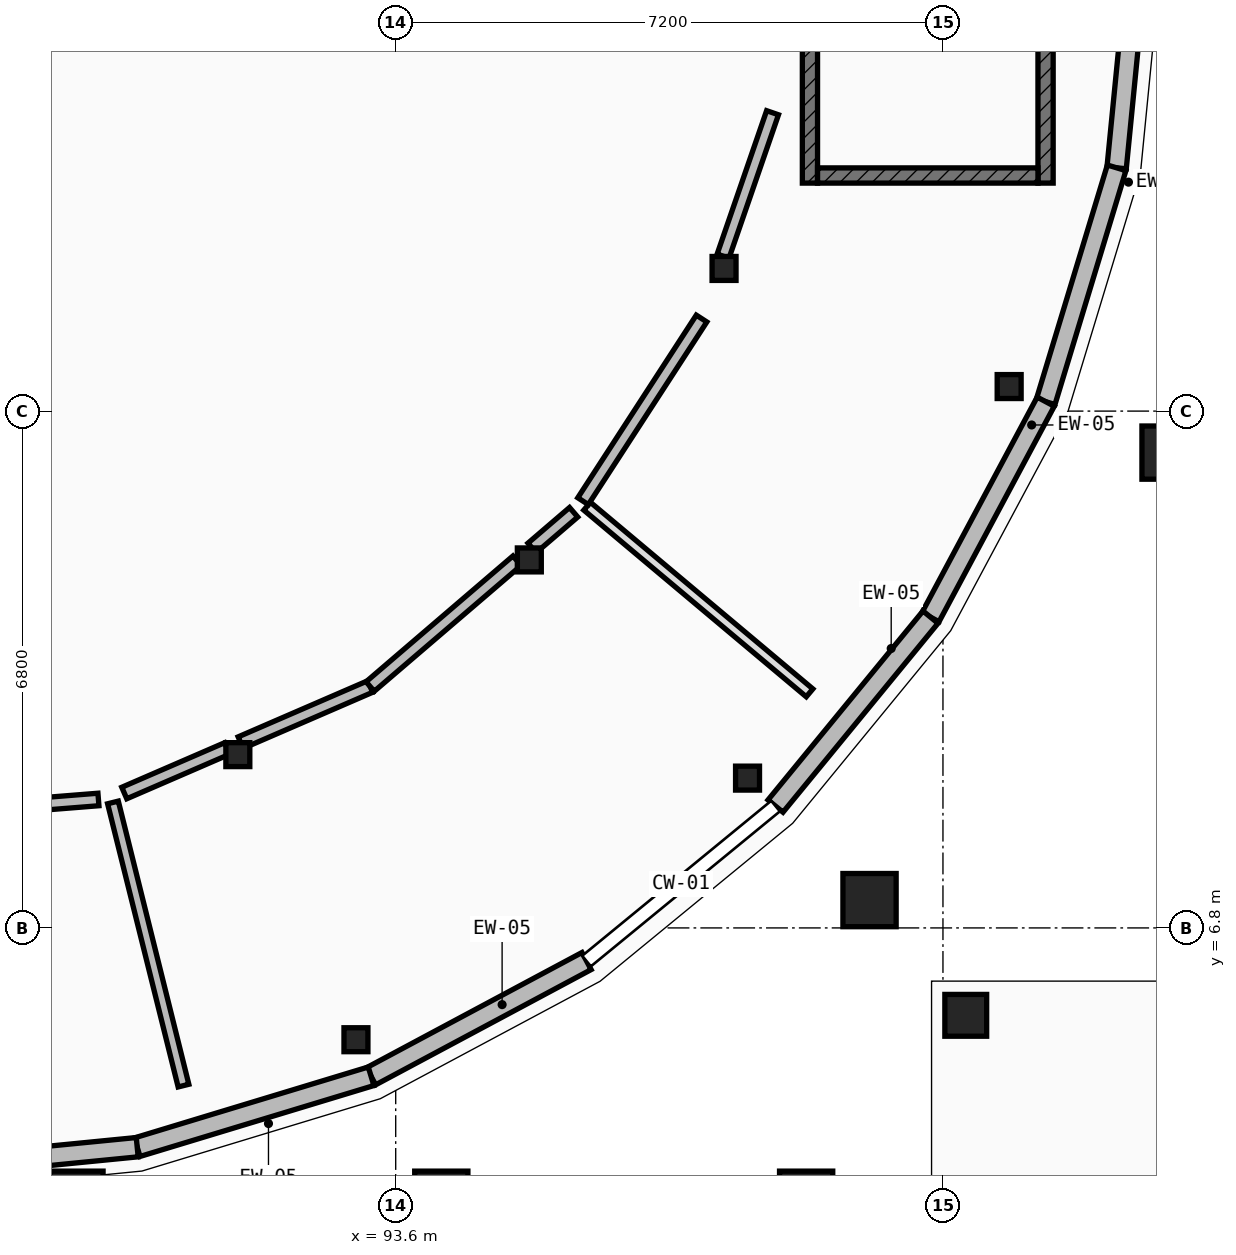
"""IFC4 building model, lengths in metres.
Left out: names, types, materials, properties, quantities, classifications, styles, units other than length and angle.
Written with IfcOpenShell. Run it as: python <this file> out.ifc"""

import sys

from ifc_helpers import new_model, si_unit, direction, frame, frame_2d, origin, origin_2d, place, context, subcontext, project, spatial, rectangle, circle, extrude, element, fill, save


model = new_model("IFC4")
c1 = context("Model", 3, precision=1e-05, world=origin(), true_north=direction((0.0, 1.0)))
c2 = subcontext(c1, "Body", "Model", "MODEL_VIEW")
j1 = project(units=[si_unit("LENGTHUNIT", "METRE"), si_unit("PLANEANGLEUNIT", "RADIAN")], contexts=[c1])
p1 = place(None, origin())
s1 = spatial("IfcSite", under=j1, at=p1, CompositionType="ELEMENT")
p2 = place(p1, origin())
s2 = spatial("IfcBuilding", under=s1, at=p2, CompositionType="ELEMENT")
p3 = place(p2, frame((0.0, 0.0, 4.55)))
s3 = spatial("IfcBuildingStorey", under=s2, at=p3, CompositionType="ELEMENT", Elevation=4.55)
for number, where, z_axis, x_axis in (
    (1, (93.077, 5.329, 0.0), (0.0, 0.0, 1.0), (1.0, 0.0, 0.0)),
    (2, (98.229, 8.771, 0.0), (0.0, 0.0, 1.0), (1.0, 0.0, 0.0)),
    (3, (101.671, 13.923, 0.0), (0.0, 0.0, 1.0), (1.0, 0.0, 0.0)),
    (4, (91.523, 9.08, 0.0), (0.0, 0.0, 1.0), (1.0, 0.0, 0.0)),
    (5, (95.358, 11.642, 0.0), (0.0, 0.0, 1.0), (1.0, 0.0, 0.0)),
    (6, (97.92, 15.477, 0.0), (0.0, 0.0, 1.0), (1.0, 0.0, 0.0)),
):
    element("IfcColumn", number, at=place(p3, frame(where, z_axis=z_axis, x_axis=x_axis)), inside=s3, PredefinedType="COLUMN", context=c2, shape_type="SweptSolid", body=[
        extrude(rectangle(XDim=0.315, YDim=0.315, at=origin_2d()), origin(), (0.0, 0.0, 1.0), 4.2),
    ])
for number, where, z_axis, x_axis in (
    (7, (89.4, 3.25, 0.0), (0.0, 0.0, 1.0), (1.0, 0.0, 0.0)),
    (8, (94.2, 3.25, 0.0), (0.0, 0.0, 1.0), (1.0, 0.0, 0.0)),
    (9, (99.0, 3.25, 0.0), (0.0, 0.0, 1.0), (1.0, 0.0, 0.0)),
):
    element("IfcColumn", number, at=place(p3, frame(where, z_axis=z_axis, x_axis=x_axis)), inside=s3, PredefinedType="COLUMN", context=c2, shape_type="SweptSolid", body=[
        extrude(circle(Radius=0.35, at=origin_2d()), origin(), (0.0, 0.0, 1.0), 4.2),
    ])
p4 = place(p3, frame((101.1, 5.65, 0.0), z_axis=(0.0, 0.0, 1.0), x_axis=(1.0, 0.0, 0.0)))
e10 = element("IfcColumn", 10, at=p4, inside=s3, PredefinedType="PILASTER", context=c2, shape_type="SweptSolid", body=[
    extrude(circle(Radius=0.275, at=origin_2d()), origin(), (0.0, 0.0, 1.0), 2.4),
])
for number, where, z_axis, x_axis in (
    (11, (99.834, 7.166, 0.0), (0.0, 0.0, 1.0), (1.0, 0.0, 0.0)),
    (12, (103.768, 13.054, 0.0), (0.0, 0.0, 1.0), (1.0, 0.0, 0.0)),
):
    element("IfcColumn", number, at=place(p3, frame(where, z_axis=z_axis, x_axis=x_axis)), inside=s3, PredefinedType="COLUMN", context=c2, shape_type="SweptSolid", body=[
        extrude(circle(Radius=0.35, at=origin_2d()), origin(), (0.0, 0.0, 1.0), 4.2),
    ])
p5 = place(p3, frame((103.4, 20.0, 0.0), z_axis=(0.0, 0.0, 1.0), x_axis=(-0.097977057849, -0.995188673637, 0.0)))
e13 = element("IfcWall", 13, at=p5, inside=s3, PredefinedType="ELEMENTEDWALL", context=c2, shape_type="SweptSolid", body=[
    extrude(rectangle(XDim=3.214, YDim=0.255, at=frame_2d((1.607, 0.0))), origin(), (0.0, 0.0, 1.0), 3.314),
])
p6 = place(p3, frame((103.085, 16.801, 0.0), z_axis=(0.0, 0.0, 1.0), x_axis=(-0.29014016356, -0.956984161567, 0.0)))
e14 = element("IfcWall", 14, at=p6, inside=s3, PredefinedType="ELEMENTEDWALL", context=c2, shape_type="SweptSolid", body=[
    extrude(rectangle(XDim=3.215, YDim=0.255, at=frame_2d((1.607, 0.0))), origin(), (0.0, 0.0, 1.0), 3.314),
])
p7 = place(p6, frame((1.198, 0.0, 0.85)))
e15 = element("IfcOpeningElement", 15, at=p7, cuts=e14, PredefinedType="OPENING", context=c2, shape_type="SweptSolid", body=[
    extrude(rectangle(XDim=0.82, YDim=1.45, at=frame_2d((0.41, 0.725))), frame((0.0, 0.137, 0.0), z_axis=(0.0, -1.0, 0.0), x_axis=(1.0, 0.0, 0.0)), (0.0, 0.0, 1.0), 0.275),
])
p8 = place(p3, frame((102.152, 13.724, 0.0), z_axis=(0.0, 0.0, 1.0), x_axis=(-0.47155750426, -0.881835313523, 0.0)))
e16 = element("IfcWall", 16, at=p8, inside=s3, PredefinedType="ELEMENTEDWALL", context=c2, shape_type="SweptSolid", body=[
    extrude(rectangle(XDim=3.215, YDim=0.255, at=frame_2d((1.607, 0.0))), origin(), (0.0, 0.0, 1.0), 3.314),
])
p9 = place(p8, frame((1.182, 0.0, 0.85)))
e17 = element("IfcOpeningElement", 17, at=p9, cuts=e16, PredefinedType="OPENING", context=c2, shape_type="SweptSolid", body=[
    extrude(rectangle(XDim=0.85, YDim=1.5, at=frame_2d((0.425, 0.75))), frame((0.0, 0.137, 0.0), z_axis=(0.0, -1.0, 0.0), x_axis=(1.0, 0.0, 0.0)), (0.0, 0.0, 1.0), 0.275),
])
p10 = place(p3, frame((100.636, 10.889, 0.0), z_axis=(0.0, 0.0, 1.0), x_axis=(-0.634204896314, -0.773165020866, 0.0)))
e18 = element("IfcWall", 18, at=p10, inside=s3, PredefinedType="ELEMENTEDWALL", context=c2, shape_type="SweptSolid", body=[
    extrude(rectangle(XDim=3.215, YDim=0.255, at=frame_2d((1.607, 0.0))), origin(), (0.0, 0.0, 1.0), 3.314),
])
p11 = place(p10, frame((1.183, 0.0, 0.85)))
e19 = element("IfcOpeningElement", 19, at=p11, cuts=e18, PredefinedType="OPENING", context=c2, shape_type="SweptSolid", body=[
    extrude(rectangle(XDim=0.85, YDim=1.75, at=frame_2d((0.425, 0.875))), frame((0.0, 0.137, 0.0), z_axis=(0.0, -1.0, 0.0), x_axis=(1.0, 0.0, 0.0)), (0.0, 0.0, 1.0), 0.275),
])
p12 = place(p3, frame((96.111, 6.364, 0.0), z_axis=(0.0, 0.0, 1.0), x_axis=(-0.881835313523, -0.47155750426, 0.0)))
e20 = element("IfcWall", 20, at=p12, inside=s3, PredefinedType="ELEMENTEDWALL", context=c2, shape_type="SweptSolid", body=[
    extrude(rectangle(XDim=3.215, YDim=0.255, at=frame_2d((1.607, 0.0))), origin(), (0.0, 0.0, 1.0), 3.314),
])
p13 = place(p12, frame((1.167, 0.0, 0.85)))
e21 = element("IfcOpeningElement", 21, at=p13, cuts=e20, PredefinedType="OPENING", context=c2, shape_type="SweptSolid", body=[
    extrude(rectangle(XDim=0.88, YDim=1.6, at=frame_2d((0.44, 0.8))), frame((0.0, 0.137, 0.0), z_axis=(0.0, -1.0, 0.0), x_axis=(1.0, 0.0, 0.0)), (0.0, 0.0, 1.0), 0.275),
])
p14 = place(p3, frame((93.276, 4.848, 0.0), z_axis=(0.0, 0.0, 1.0), x_axis=(-0.956984161567, -0.29014016356, 0.0)))
e22 = element("IfcWall", 22, at=p14, inside=s3, PredefinedType="ELEMENTEDWALL", context=c2, shape_type="SweptSolid", body=[
    extrude(rectangle(XDim=3.215, YDim=0.255, at=frame_2d((1.607, 0.0))), origin(), (0.0, 0.0, 1.0), 3.314),
])
p15 = place(p14, frame((1.158, 0.0, 0.85)))
e23 = element("IfcOpeningElement", 23, at=p15, cuts=e22, PredefinedType="OPENING", context=c2, shape_type="SweptSolid", body=[
    extrude(rectangle(XDim=0.9, YDim=1.4, at=frame_2d((0.45, 0.7))), frame((0.0, 0.137, 0.0), z_axis=(0.0, -1.0, 0.0), x_axis=(1.0, 0.0, 0.0)), (0.0, 0.0, 1.0), 0.275),
])
p16 = place(p3, frame((90.199, 3.915, 0.0), z_axis=(0.0, 0.0, 1.0), x_axis=(-0.995188673637, -0.097977057849, 0.0)))
e24 = element("IfcWall", 24, at=p16, inside=s3, PredefinedType="ELEMENTEDWALL", context=c2, shape_type="SweptSolid", body=[
    extrude(rectangle(XDim=3.214, YDim=0.255, at=frame_2d((1.607, 0.0))), origin(), (0.0, 0.0, 1.0), 3.314),
])
p17 = place(p3, frame((99.05, 23.4, 0.0), z_axis=(0.0, 0.0, 1.0), x_axis=(0.0, -1.0, 0.0)))
e25 = element("IfcWall", 25, at=p17, inside=s3, PredefinedType="SHEAR", context=c2, shape_type="SweptSolid", body=[
    extrude(rectangle(XDim=6.8, YDim=0.2, at=frame_2d((3.4, 0.0))), origin(), (0.0, 0.0, 1.0), 3.3),
])
p18 = place(p17, frame((0.38, 0.0, 0.0)))
e26 = element("IfcOpeningElement", 26, at=p18, cuts=e25, PredefinedType="OPENING", context=c2, shape_type="SweptSolid", body=[
    extrude(rectangle(XDim=1.1, YDim=2.15, at=frame_2d((0.55, 1.075))), frame((0.0, 0.11, 0.0), z_axis=(0.0, -1.0, 0.0), x_axis=(1.0, 0.0, 0.0)), (0.0, 0.0, 1.0), 0.22),
])
p19 = place(p3, frame((102.15, 23.4, 0.0), z_axis=(0.0, 0.0, 1.0), x_axis=(0.0, -1.0, 0.0)))
e27 = element("IfcWall", 27, at=p19, inside=s3, PredefinedType="SHEAR", context=c2, shape_type="SweptSolid", body=[
    extrude(rectangle(XDim=6.8, YDim=0.2, at=frame_2d((3.4, 0.0))), origin(), (0.0, 0.0, 1.0), 3.3),
])
p20 = place(p3, frame((99.15, 16.7, 0.0), z_axis=(0.0, 0.0, 1.0), x_axis=(1.0, 0.0, 0.0)))
e28 = element("IfcWall", 28, at=p20, inside=s3, PredefinedType="SHEAR", context=c2, shape_type="SweptSolid", body=[
    extrude(rectangle(XDim=2.9, YDim=0.2, at=frame_2d((1.45, 0.0))), origin(), (0.0, 0.0, 1.0), 3.3),
])
p21 = place(p3, frame((89.88, 8.451, 0.0), z_axis=(0.0, 0.0, 1.0), x_axis=(0.241742626418, -0.970340405514, 0.0)))
e29 = element("IfcWall", 29, at=p21, inside=s3, PredefinedType="PARTITIONING", context=c2, shape_type="SweptSolid", body=[
    extrude(rectangle(XDim=3.84, YDim=0.145, at=frame_2d((1.92, 0.0))), origin(), (0.0, 0.0, 1.0), 3.3),
])
p22 = place(p3, frame((96.118, 12.349, 0.0), z_axis=(0.0, 0.0, 1.0), x_axis=(0.766043356979, -0.642788904096, 0.0)))
e30 = element("IfcWall", 30, at=p22, inside=s3, PredefinedType="PLUMBINGWALL", context=c2, shape_type="SweptSolid", body=[
    extrude(rectangle(XDim=3.821, YDim=0.135, at=frame_2d((1.911, 0.0))), origin(), (0.0, 0.0, 1.0), 3.3),
])
p23 = place(p3, frame((87.124, 8.285, 0.0), z_axis=(0.0, 0.0, 1.0), x_axis=(0.996818897766, 0.079699968982, 0.0)))
e31 = element("IfcWall", 31, at=p23, inside=s3, PredefinedType="PARTITIONING", context=c2, shape_type="SweptSolid", body=[
    extrude(rectangle(XDim=2.573, YDim=0.165, at=frame_2d((1.287, 0.0))), origin(), (0.0, 0.0, 1.0), 3.3),
])
p24 = place(p3, frame((90.029, 8.575, 0.0), z_axis=(0.0, 0.0, 1.0), x_axis=(0.917648226471, 0.397393674401, 0.0)))
e32 = element("IfcWall", 32, at=p24, inside=s3, PredefinedType="PARTITIONING", context=c2, shape_type="SweptSolid", body=[
    extrude(rectangle(XDim=1.474, YDim=0.165, at=frame_2d((0.737, 0.0))), origin(), (0.0, 0.0, 1.0), 3.3),
])
p25 = place(p24, frame((0.282, 0.0, 0.0)))
e33 = element("IfcOpeningElement", 33, at=p25, cuts=e32, PredefinedType="OPENING", context=c2, shape_type="SweptSolid", body=[
    extrude(rectangle(XDim=0.91, YDim=2.15, at=frame_2d((0.455, 1.075))), frame((0.0, 0.093, 0.0), z_axis=(0.0, -1.0, 0.0), x_axis=(1.0, 0.0, 0.0)), (0.0, 0.0, 1.0), 0.185),
])
p26 = place(p3, frame((91.56, 9.238, 0.0), z_axis=(0.0, 0.0, 1.0), x_axis=(0.917614776026, 0.397470908142, 0.0)))
e34 = element("IfcWall", 34, at=p26, inside=s3, PredefinedType="PARTITIONING", context=c2, shape_type="SweptSolid", body=[
    extrude(rectangle(XDim=1.857, YDim=0.165, at=frame_2d((0.928, 0.0))), origin(), (0.0, 0.0, 1.0), 3.3),
])
p27 = place(p3, frame((93.264, 9.976, 0.0), z_axis=(0.0, 0.0, 1.0), x_axis=(0.759466556713, 0.650546346722, 0.0)))
e35 = element("IfcWall", 35, at=p27, inside=s3, PredefinedType="PARTITIONING", context=c2, shape_type="SweptSolid", body=[
    extrude(rectangle(XDim=2.544, YDim=0.165, at=frame_2d((1.272, 0.0))), origin(), (0.0, 0.0, 1.0), 3.3),
])
p28 = place(p3, frame((95.394, 11.8, 0.0), z_axis=(0.0, 0.0, 1.0), x_axis=(0.759089131102, 0.650986705735, 0.0)))
e36 = element("IfcWall", 36, at=p28, inside=s3, PredefinedType="PARTITIONING", context=c2, shape_type="SweptSolid", body=[
    extrude(rectangle(XDim=0.72, YDim=0.165, at=frame_2d((0.36, 0.0))), origin(), (0.0, 0.0, 1.0), 3.3),
])
p29 = place(p3, frame((96.065, 12.415, 0.0), z_axis=(0.0, 0.0, 1.0), x_axis=(0.544272168669, 0.838908699688, 0.0)))
e37 = element("IfcWall", 37, at=p29, inside=s3, PredefinedType="PARTITIONING", context=c2, shape_type="SweptSolid", body=[
    extrude(rectangle(XDim=2.865, YDim=0.165, at=frame_2d((1.432, 0.0))), origin(), (0.0, 0.0, 1.0), 3.3),
])
p30 = place(p29, frame((0.982, 0.0, 0.0)))
e38 = element("IfcOpeningElement", 38, at=p30, cuts=e37, PredefinedType="OPENING", context=c2, shape_type="SweptSolid", body=[
    extrude(rectangle(XDim=0.9, YDim=2.1, at=frame_2d((0.45, 1.05))), frame((0.0, 0.093, 0.0), z_axis=(0.0, -1.0, 0.0), x_axis=(1.0, 0.0, 0.0)), (0.0, 0.0, 1.0), 0.185),
])
p31 = place(p3, frame((97.907, 15.639, 0.0), z_axis=(0.0, 0.0, 1.0), x_axis=(0.326190447052, 0.945304073964, 0.0)))
e39 = element("IfcWall", 39, at=p31, inside=s3, PredefinedType="PARTITIONING", context=c2, shape_type="SweptSolid", body=[
    extrude(rectangle(XDim=1.996, YDim=0.165, at=frame_2d((0.998, 0.0))), origin(), (0.0, 0.0, 1.0), 3.3),
])
p32 = place(p7, origin())
e40 = element("IfcWindow", 40, at=p32, inside=s3, PartitioningType="SINGLE_PANEL", PredefinedType="WINDOW", context=c2, shape_type="SweptSolid", body=[
    extrude(rectangle(XDim=0.82, YDim=1.45, at=frame_2d((0.41, 0.725))), frame((0.0, 0.03, 0.0), z_axis=(0.0, -1.0, 0.0), x_axis=(1.0, 0.0, 0.0)), (0.0, 0.0, 1.0), 0.06),
])
fill(e15, e40)
p33 = place(p9, origin())
e41 = element("IfcWindow", 41, at=p33, inside=s3, PartitioningType="SINGLE_PANEL", PredefinedType="WINDOW", context=c2, shape_type="SweptSolid", body=[
    extrude(rectangle(XDim=0.85, YDim=1.5, at=frame_2d((0.425, 0.75))), frame((0.0, 0.03, 0.0), z_axis=(0.0, -1.0, 0.0), x_axis=(1.0, 0.0, 0.0)), (0.0, 0.0, 1.0), 0.06),
])
fill(e17, e41)
p34 = place(p11, origin())
e42 = element("IfcWindow", 42, at=p34, inside=s3, PartitioningType="SINGLE_PANEL", PredefinedType="WINDOW", context=c2, shape_type="SweptSolid", body=[
    extrude(rectangle(XDim=0.85, YDim=1.75, at=frame_2d((0.425, 0.875))), frame((0.0, 0.03, 0.0), z_axis=(0.0, -1.0, 0.0), x_axis=(1.0, 0.0, 0.0)), (0.0, 0.0, 1.0), 0.06),
])
fill(e19, e42)
p35 = place(p13, origin())
e43 = element("IfcWindow", 43, at=p35, inside=s3, PartitioningType="SINGLE_PANEL", PredefinedType="WINDOW", context=c2, shape_type="SweptSolid", body=[
    extrude(rectangle(XDim=0.88, YDim=1.6, at=frame_2d((0.44, 0.8))), frame((0.0, 0.03, 0.0), z_axis=(0.0, -1.0, 0.0), x_axis=(1.0, 0.0, 0.0)), (0.0, 0.0, 1.0), 0.06),
])
fill(e21, e43)
p36 = place(p15, origin())
e44 = element("IfcWindow", 44, at=p36, inside=s3, PartitioningType="SINGLE_PANEL", PredefinedType="WINDOW", context=c2, shape_type="SweptSolid", body=[
    extrude(rectangle(XDim=0.9, YDim=1.4, at=frame_2d((0.45, 0.7))), frame((0.0, 0.03, 0.0), z_axis=(0.0, -1.0, 0.0), x_axis=(1.0, 0.0, 0.0)), (0.0, 0.0, 1.0), 0.06),
])
fill(e23, e44)
p37 = place(p25, origin())
e45 = element("IfcDoor", 45, at=p37, inside=s3, OperationType="SINGLE_SWING_RIGHT", PredefinedType="DOOR", context=c2, shape_type="SweptSolid", body=[
    extrude(rectangle(XDim=0.91, YDim=2.15, at=frame_2d((0.455, 1.075))), frame((0.0, 0.025, 0.0), z_axis=(0.0, -1.0, 0.0), x_axis=(1.0, 0.0, 0.0)), (0.0, 0.0, 1.0), 0.05),
])
fill(e33, e45)
p38 = place(p30, origin())
e46 = element("IfcDoor", 46, at=p38, inside=s3, OperationType="SINGLE_SWING_LEFT", PredefinedType="DOOR", context=c2, shape_type="SweptSolid", body=[
    extrude(rectangle(XDim=0.9, YDim=2.1, at=frame_2d((0.45, 1.05))), frame((0.0, 0.025, 0.0), z_axis=(0.0, -1.0, 0.0), x_axis=(1.0, 0.0, 0.0)), (0.0, 0.0, 1.0), 0.05),
])
fill(e38, e46)
save(model, sys.argv[1])
